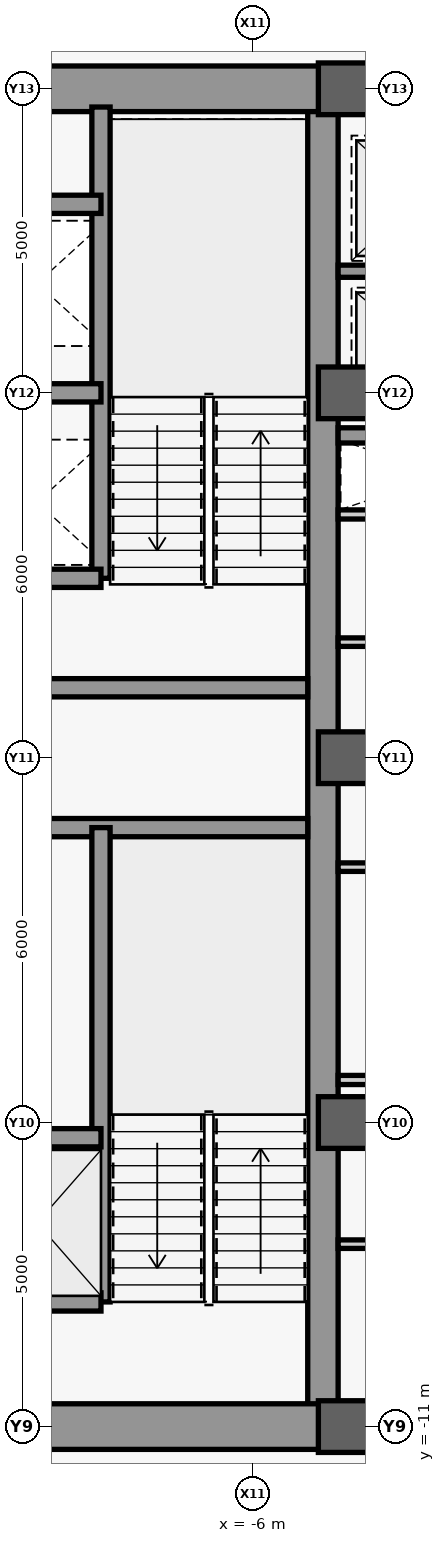
"""IFC4 building model, lengths in metres.
Left out: names, types, materials, properties, quantities, classifications, styles, units other than length and angle.
Written with IfcOpenShell. Run it as: python <this file> out.ifc"""

import sys

from ifc_helpers import new_model, si_unit, direction, frame, frame_2d, origin, origin_2d, place, context, subcontext, project, spatial, rectangle, extrude, source, transform, mapped, element, save


model = new_model("IFC4")
c1 = context("Model", 3, precision=1e-05, world=origin(), true_north=direction((0.0, 1.0)))
c2 = subcontext(c1, "Body", "Model", "MODEL_VIEW")
j1 = project(units=[si_unit("LENGTHUNIT", "METRE"), si_unit("PLANEANGLEUNIT", "RADIAN")], contexts=[c1])
p1 = place(None, origin())
s1 = spatial("IfcSite", under=j1, at=p1, CompositionType="ELEMENT")
p2 = place(p1, origin())
s2 = spatial("IfcBuilding", under=s1, at=p2, CompositionType="ELEMENT")
p3 = place(p2, frame((0.0, 0.0, 171.1)))
s3 = spatial("IfcBuildingStorey", under=s2, at=p3, CompositionType="ELEMENT", Elevation=171.1)
m1 = source(origin(), c2, "Body", "SweptSolid", [
    extrude(rectangle(XDim=21.4, YDim=0.5, at=frame_2d((10.7, 0.0))), origin(), (0.0, 0.0, 1.0), 3.78),
])
p4 = place(p3, frame((-4.85, -10.7, 0.0), z_axis=(0.0, 0.0, 1.0), x_axis=(0.0, 1.0, 0.0)))
e1 = element("IfcWall", 1, at=p4, inside=s3, PredefinedType="SHEAR", context=c2, shape_type="MappedRepresentation", body=[
    mapped(m1, transform((0.0, 0.0, 0.0), scale=1.0)),
])
m2 = source(origin(), c2, "Body", "SweptSolid", [
    extrude(rectangle(XDim=5.85, YDim=0.75, at=frame_2d((2.925, 0.0))), origin(), (0.0, 0.0, 1.0), 3.78),
])
for number, where, z_axis, x_axis in (
    (2, (-10.7, -11.0, 0.0), (0.0, 0.0, 1.0), (1.0, 0.0, 0.0)),
    (3, (-10.7, 11.0, 0.0), (0.0, 0.0, 1.0), (1.0, 0.0, 0.0)),
):
    element("IfcWall", number, at=place(p3, frame(where, z_axis=z_axis, x_axis=x_axis)), inside=s3, PredefinedType="SHEAR", context=c2, shape_type="MappedRepresentation", body=[
        mapped(m2, transform((0.0, 0.0, 0.0), scale=1.0)),
    ])
m3 = source(origin(), c2, "Body", "SweptSolid", [
    extrude(rectangle(XDim=5.6, YDim=0.3, at=frame_2d((2.8, 0.0))), origin(), (0.0, 0.0, 1.0), 3.78),
])
for number, where, z_axis, x_axis in (
    (4, (-10.7, -1.15, 0.0), (0.0, 0.0, 1.0), (1.0, 0.0, 0.0)),
    (5, (-10.7, 1.15, 0.0), (0.0, 0.0, 1.0), (1.0, 0.0, 0.0)),
):
    element("IfcWall", number, at=place(p3, frame(where, z_axis=z_axis, x_axis=x_axis)), inside=s3, PredefinedType="SHEAR", context=c2, shape_type="MappedRepresentation", body=[
        mapped(m3, transform((0.0, 0.0, 0.0), scale=1.0)),
    ])
m4 = source(origin(), c2, "Body", "SweptSolid", [
    extrude(rectangle(XDim=9.2, YDim=0.5, at=frame_2d((4.6, 0.0))), origin(), (0.0, 0.0, 1.0), 3.78),
])
p5 = place(p3, frame((-4.6, -11.0, 0.0), z_axis=(0.0, 0.0, 1.0), x_axis=(1.0, 0.0, 0.0)))
e6 = element("IfcWall", 6, at=p5, inside=s3, PredefinedType="SHEAR", context=c2, shape_type="MappedRepresentation", body=[
    mapped(m4, transform((0.0, 0.0, 0.0), scale=1.0)),
])
m5 = source(origin(), c2, "Body", "SweptSolid", [
    extrude(rectangle(XDim=1.8, YDim=2.25, at=frame_2d((0.9, 1.125))), frame((0.0, 0.26, 0.0), z_axis=(0.0, -1.0, 0.0), x_axis=(1.0, 0.0, 0.0)), (0.0, 0.0, 1.0), 0.52),
])
p6 = place(p5, frame((3.7, 0.0, 0.0)))
e7 = element("IfcOpeningElement", 7, at=p6, cuts=e6, PredefinedType="OPENING", context=c2, shape_type="MappedRepresentation", body=[
    mapped(m5, transform((0.0, 0.0, 0.0), scale=1.0)),
])
p7 = place(p3, frame((-4.6, 11.0, 0.0), z_axis=(0.0, 0.0, 1.0), x_axis=(1.0, 0.0, 0.0)))
e8 = element("IfcWall", 8, at=p7, inside=s3, PredefinedType="SHEAR", context=c2, shape_type="MappedRepresentation", body=[
    mapped(m4, transform((0.0, 0.0, 0.0), scale=1.0)),
])
p8 = place(p7, frame((3.7, 0.0, 0.0)))
e9 = element("IfcOpeningElement", 9, at=p8, cuts=e8, PredefinedType="OPENING", context=c2, shape_type="MappedRepresentation", body=[
    mapped(m5, transform((0.0, 0.0, 0.0), scale=1.0)),
])
m6 = source(origin(), c2, "Body", "SweptSolid", [
    extrude(rectangle(XDim=0.85, YDim=0.85, at=origin_2d()), origin(), (0.0, 0.0, 1.0), 4.0),
])
for number, where, z_axis, x_axis in (
    (10, (-4.5, -11.0, 0.0), (0.0, 0.0, 1.0), (1.0, 0.0, 0.0)),
    (11, (-4.5, -6.0, 0.0), (0.0, 0.0, 1.0), (1.0, 0.0, 0.0)),
    (12, (-4.5, 0.0, 0.0), (0.0, 0.0, 1.0), (1.0, 0.0, 0.0)),
    (13, (-4.5, 6.0, 0.0), (0.0, 0.0, 1.0), (1.0, 0.0, 0.0)),
    (14, (-4.5, 11.0, 0.0), (0.0, 0.0, 1.0), (1.0, 0.0, 0.0)),
):
    element("IfcColumn", number, at=place(p3, frame(where, z_axis=z_axis, x_axis=x_axis)), inside=s3, PredefinedType="COLUMN", context=c2, shape_type="MappedRepresentation", body=[
        mapped(m6, transform((0.0, 0.0, 0.0), scale=1.0)),
    ])
m7 = source(origin(), c2, "Body", "SweptSolid", [
    extrude(rectangle(XDim=7.8, YDim=0.3, at=frame_2d((3.9, 0.0))), origin(), (0.0, 0.0, 1.0), 3.78),
])
p9 = place(p3, frame((-8.5, -8.95, 0.0), z_axis=(0.0, 0.0, 1.0), x_axis=(0.0, 1.0, 0.0)))
e15 = element("IfcWall", 15, at=p9, inside=s3, PredefinedType="SHEAR", context=c2, shape_type="MappedRepresentation", body=[
    mapped(m7, transform((0.0, 0.0, 0.0), scale=1.0)),
])
m8 = source(origin(), c2, "Body", "SweptSolid", [
    extrude(rectangle(XDim=2.2, YDim=0.3, at=frame_2d((1.1, 0.0))), origin(), (0.0, 0.0, 1.0), 3.78),
])
for number, where, z_axis, x_axis in (
    (16, (-10.7, -8.95, 0.0), (0.0, 0.0, 1.0), (1.0, 0.0, 0.0)),
    (17, (-10.7, -6.25, 0.0), (0.0, 0.0, 1.0), (1.0, 0.0, 0.0)),
):
    element("IfcWall", number, at=place(p3, frame(where, z_axis=z_axis, x_axis=x_axis)), inside=s3, PredefinedType="SHEAR", context=c2, shape_type="MappedRepresentation", body=[
        mapped(m8, transform((0.0, 0.0, 0.0), scale=1.0)),
    ])
m9 = source(origin(), c2, "Body", "SweptSolid", [
    extrude(rectangle(XDim=7.75, YDim=0.3, at=frame_2d((3.875, 0.0))), origin(), (0.0, 0.0, 1.0), 3.78),
])
p10 = place(p3, frame((-8.5, 2.95, 0.0), z_axis=(0.0, 0.0, 1.0), x_axis=(0.0, 1.0, 0.0)))
e18 = element("IfcWall", 18, at=p10, inside=s3, PredefinedType="SHEAR", context=c2, shape_type="MappedRepresentation", body=[
    mapped(m9, transform((0.0, 0.0, 0.0), scale=1.0)),
])
for number, where, z_axis, x_axis in (
    (19, (-10.7, 2.95, 0.0), (0.0, 0.0, 1.0), (1.0, 0.0, 0.0)),
    (20, (-10.7, 6.0, 0.0), (0.0, 0.0, 1.0), (1.0, 0.0, 0.0)),
    (21, (-10.7, 9.1, 0.0), (0.0, 0.0, 1.0), (1.0, 0.0, 0.0)),
):
    element("IfcWall", number, at=place(p3, frame(where, z_axis=z_axis, x_axis=x_axis)), inside=s3, PredefinedType="SHEAR", context=c2, shape_type="MappedRepresentation", body=[
        mapped(m8, transform((0.0, 0.0, 0.0), scale=1.0)),
    ])
m10 = source(origin(), c2, "Body", "SweptSolid", [
    extrude(rectangle(XDim=3.45, YDim=0.15, at=frame_2d((1.725, 0.0))), origin(), (0.0, 0.0, 1.0), 3.78),
])
p11 = place(p3, frame((-4.6, 4.0, 0.0), z_axis=(0.0, 0.0, 1.0), x_axis=(1.0, 0.0, 0.0)))
e22 = element("IfcWall", 22, at=p11, inside=s3, PredefinedType="PARTITIONING", context=c2, shape_type="MappedRepresentation", body=[
    mapped(m10, transform((0.0, 0.0, 0.0), scale=1.0)),
])
m11 = source(origin(), c2, "Body", "SweptSolid", [
    extrude(rectangle(XDim=3.45, YDim=0.14, at=frame_2d((1.725, 0.0))), origin(), (0.0, 0.0, 1.0), 3.78),
])
p12 = place(p3, frame((-4.6, -8.0, 0.0), z_axis=(0.0, 0.0, 1.0), x_axis=(1.0, 0.0, 0.0)))
e23 = element("IfcWall", 23, at=p12, inside=s3, PredefinedType="PARTITIONING", context=c2, shape_type="MappedRepresentation", body=[
    mapped(m11, transform((0.0, 0.0, 0.0), scale=1.0)),
])
p13 = place(p3, frame((-4.6, -5.3, 0.0), z_axis=(0.0, 0.0, 1.0), x_axis=(1.0, 0.0, 0.0)))
e24 = element("IfcWall", 24, at=p13, inside=s3, PredefinedType="PARTITIONING", context=c2, shape_type="MappedRepresentation", body=[
    mapped(m10, transform((0.0, 0.0, 0.0), scale=1.0)),
])
m12 = source(origin(), c2, "Body", "SweptSolid", [
    extrude(rectangle(XDim=2.45, YDim=0.2, at=frame_2d((1.225, 0.0))), origin(), (0.0, 0.0, 1.0), 3.78),
])
p14 = place(p3, frame((-4.6, 8.0, 0.0), z_axis=(0.0, 0.0, 1.0), x_axis=(1.0, 0.0, 0.0)))
e25 = element("IfcWall", 25, at=p14, inside=s3, PredefinedType="SHEAR", context=c2, shape_type="MappedRepresentation", body=[
    mapped(m12, transform((0.0, 0.0, 0.0), scale=1.0)),
])
m13 = source(origin(), c2, "Body", "SweptSolid", [
    extrude(rectangle(XDim=9.2, YDim=0.25, at=frame_2d((4.6, 0.0))), origin(), (0.0, 0.0, 1.0), 3.78),
])
p15 = place(p3, frame((-4.6, 5.3, 0.0), z_axis=(0.0, 0.0, 1.0), x_axis=(1.0, 0.0, 0.0)))
e26 = element("IfcWall", 26, at=p15, inside=s3, PredefinedType="SHEAR", context=c2, shape_type="MappedRepresentation", body=[
    mapped(m13, transform((0.0, 0.0, 0.0), scale=1.0)),
])
m14 = source(origin(), c2, "Body", "SweptSolid", [
    extrude(rectangle(XDim=1.05, YDim=2.2, at=frame_2d((0.525, 1.1))), frame((0.0, 0.135, 0.0), z_axis=(0.0, -1.0, 0.0), x_axis=(1.0, 0.0, 0.0)), (0.0, 0.0, 1.0), 0.27),
])
p16 = place(p15, frame((4.075, 0.0, 0.0)))
e27 = element("IfcOpeningElement", 27, at=p16, cuts=e26, PredefinedType="OPENING", context=c2, shape_type="MappedRepresentation", body=[
    mapped(m14, transform((0.0, 0.0, 0.0), scale=1.0)),
])
for number, where, z_axis, x_axis in (
    (28, (-4.6, -1.8, 0.0), (0.0, 0.0, 1.0), (1.0, 0.0, 0.0)),
    (29, (-4.6, 1.9, 0.0), (0.0, 0.0, 1.0), (1.0, 0.0, 0.0)),
):
    element("IfcWall", number, at=place(p3, frame(where, z_axis=z_axis, x_axis=x_axis)), inside=s3, PredefinedType="PARTITIONING", context=c2, shape_type="MappedRepresentation", body=[
        mapped(m11, transform((0.0, 0.0, 0.0), scale=1.0)),
    ])
save(model, sys.argv[1])
